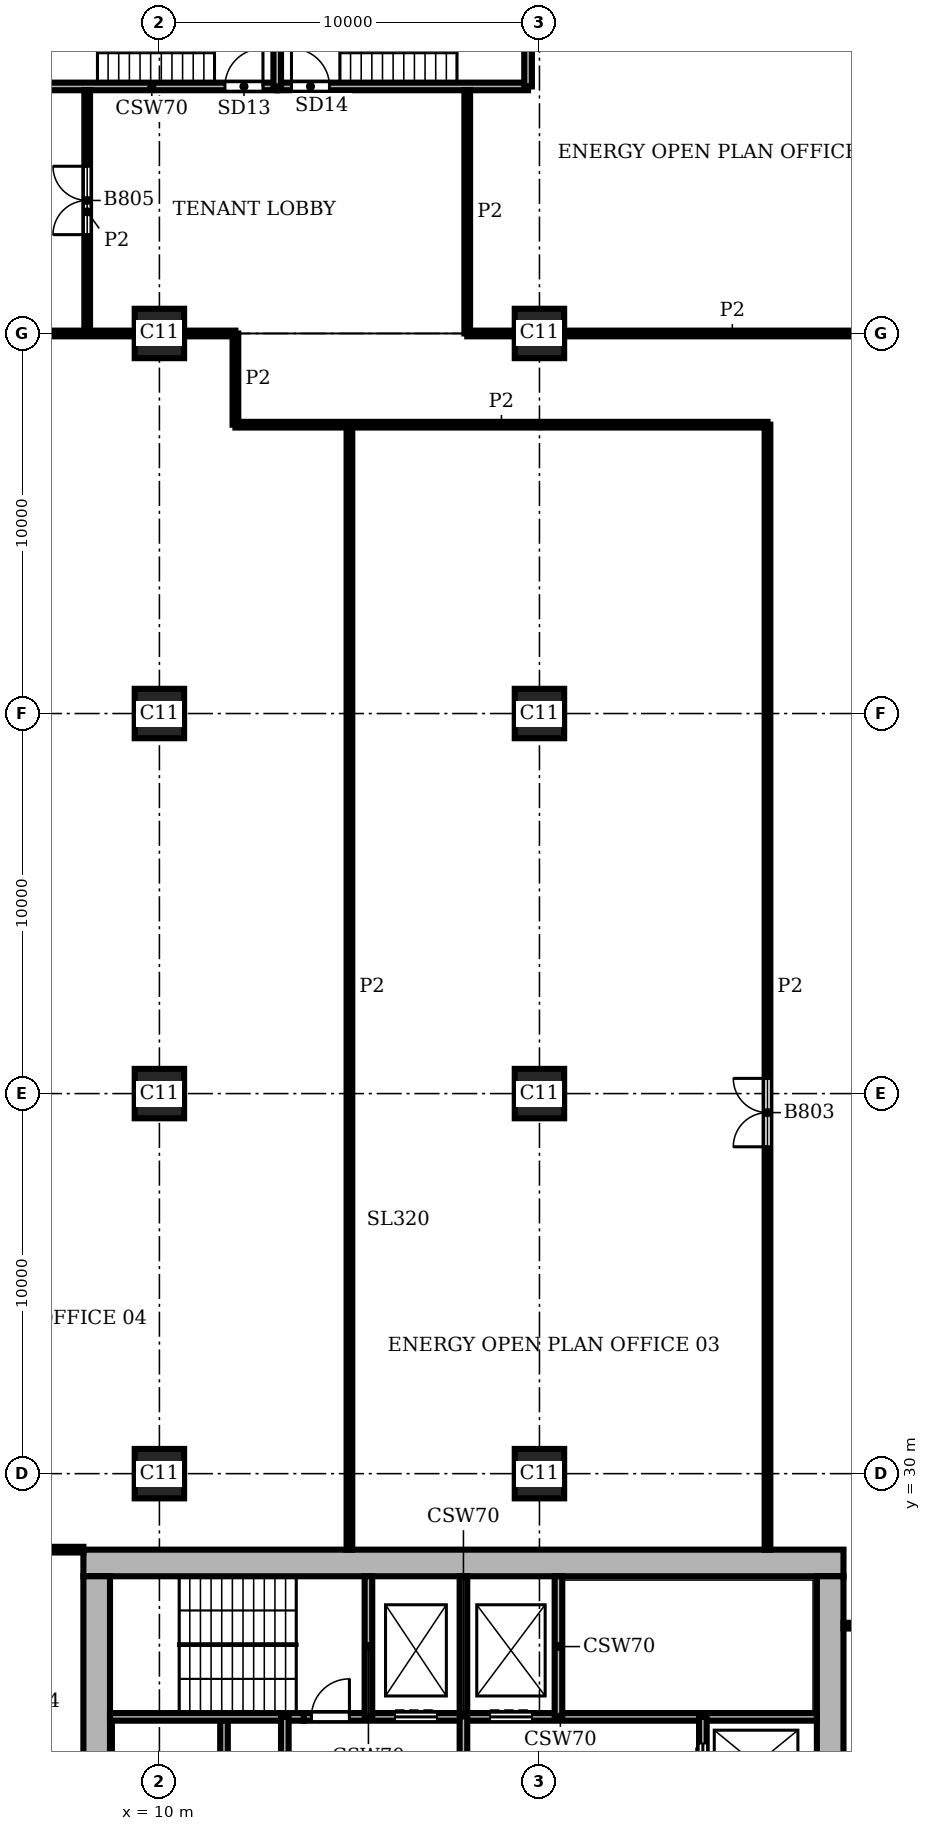
"""IFC4 building model, lengths in metres.
Left out: names, types, materials, properties, quantities, classifications, styles, units other than length and angle.
Written with IfcOpenShell. Run it as: python <this file> out.ifc"""

import sys

from ifc_helpers import new_model, si_unit, direction, frame, frame_2d, origin, origin_2d, place, context, subcontext, project, spatial, rectangle, extrude, element, fill, save


model = new_model("IFC4")
c1 = context("Model", 3, precision=1e-05, world=origin(), true_north=direction((0.0, 1.0)))
c2 = subcontext(c1, "Body", "Model", "MODEL_VIEW")
j1 = project(units=[si_unit("LENGTHUNIT", "METRE"), si_unit("PLANEANGLEUNIT", "RADIAN")], contexts=[c1])
p1 = place(None, origin())
s1 = spatial("IfcSite", under=j1, at=p1, CompositionType="ELEMENT")
p2 = place(p1, origin())
s2 = spatial("IfcBuilding", under=s1, at=p2, CompositionType="ELEMENT")
p3 = place(p2, frame((0.0, 0.0, 213.6)))
s3 = spatial("IfcBuildingStorey", under=s2, at=p3, CompositionType="ELEMENT", Elevation=213.6)
for number, where, z_axis, x_axis in (
    (1, (10.0, 30.0, 0.0), (0.0, 0.0, 1.0), (1.0, 0.0, 0.0)),
    (2, (10.0, 40.0, 0.0), (0.0, 0.0, 1.0), (1.0, 0.0, 0.0)),
    (3, (10.0, 50.0, 0.0), (0.0, 0.0, 1.0), (1.0, 0.0, 0.0)),
    (4, (10.0, 60.0, 0.0), (0.0, 0.0, 1.0), (1.0, 0.0, 0.0)),
    (5, (20.0, 30.0, 0.0), (0.0, 0.0, 1.0), (1.0, 0.0, 0.0)),
    (6, (20.0, 40.0, 0.0), (0.0, 0.0, 1.0), (1.0, 0.0, 0.0)),
    (7, (20.0, 50.0, 0.0), (0.0, 0.0, 1.0), (1.0, 0.0, 0.0)),
    (8, (20.0, 60.0, 0.0), (0.0, 0.0, 1.0), (1.0, 0.0, 0.0)),
):
    element("IfcColumn", number, at=place(p3, frame(where, z_axis=z_axis, x_axis=x_axis)), inside=s3, PredefinedType="COLUMN", context=c2, shape_type="SweptSolid", body=[
        extrude(rectangle(XDim=1.3, YDim=1.3, at=origin_2d()), origin(), (0.0, 0.0, 1.0), 3.9),
    ])
p4 = place(p3, frame((27.65, 8.7, 0.0), z_axis=(0.0, 0.0, 1.0), x_axis=(0.0, 1.0, 0.0)))
e9 = element("IfcWall", 9, at=p4, inside=s3, PredefinedType="SHEAR", context=c2, shape_type="SweptSolid", body=[
    extrude(rectangle(XDim=18.6, YDim=0.7, at=frame_2d((9.3, 0.0))), origin(), (0.0, 0.0, 1.0), 3.9),
])
p5 = place(p4, frame((4.75, 0.0, 0.0)))
e10 = element("IfcOpeningElement", 10, at=p5, cuts=e9, PredefinedType="OPENING", context=c2, shape_type="SweptSolid", body=[
    extrude(rectangle(XDim=1.6, YDim=2.1, at=frame_2d((0.8, 1.05))), frame((0.0, 0.36, 0.0), z_axis=(0.0, -1.0, 0.0), x_axis=(1.0, 0.0, 0.0)), (0.0, 0.0, 1.0), 0.72),
])
p6 = place(p3, frame((28.0, 27.65, 0.0), z_axis=(0.0, 0.0, 1.0), x_axis=(-1.0, 0.0, 0.0)))
e11 = element("IfcWall", 11, at=p6, inside=s3, PredefinedType="SHEAR", context=c2, shape_type="SweptSolid", body=[
    extrude(rectangle(XDim=20.0, YDim=0.7, at=frame_2d((10.0, 0.0))), origin(), (0.0, 0.0, 1.0), 3.9),
])
p7 = place(p3, frame((8.35, 27.3, 0.0), z_axis=(0.0, 0.0, 1.0), x_axis=(0.0, -1.0, 0.0)))
e12 = element("IfcWall", 12, at=p7, inside=s3, PredefinedType="SHEAR", context=c2, shape_type="SweptSolid", body=[
    extrude(rectangle(XDim=18.6, YDim=0.7, at=frame_2d((9.3, 0.0))), origin(), (0.0, 0.0, 1.0), 3.9),
])
p8 = place(p3, frame((29.357, 66.434, 0.0), z_axis=(0.0, 0.0, 1.0), x_axis=(-0.555541552266, 0.831488775454, 0.0)))
e13 = element("IfcWall", 13, at=p8, inside=s3, PredefinedType="SOLIDWALL", context=c2, shape_type="SweptSolid", body=[
    extrude(rectangle(XDim=4.753, YDim=0.4, at=frame_2d((2.376, 0.0))), origin(), (0.0, 0.0, 1.0), 3.9),
])
p9 = place(p8, frame((0.226, 0.0, 0.9)))
e14 = element("IfcOpeningElement", 14, at=p9, cuts=e13, PredefinedType="OPENING", context=c2, shape_type="SweptSolid", body=[
    extrude(rectangle(XDim=4.3, YDim=2.35, at=frame_2d((2.15, 1.175))), frame((0.0, 0.21, 0.0), z_axis=(0.0, -1.0, 0.0), x_axis=(1.0, 0.0, 0.0)), (0.0, 0.0, 1.0), 0.42),
])
p10 = place(p3, frame((8.7, 23.6, 0.0), z_axis=(0.0, 0.0, 1.0), x_axis=(1.0, 0.0, 0.0)))
e15 = element("IfcWall", 15, at=p10, inside=s3, PredefinedType="SHEAR", context=c2, shape_type="SweptSolid", body=[
    extrude(rectangle(XDim=5.1, YDim=0.2, at=frame_2d((2.55, 0.0))), origin(), (0.0, 0.0, 1.0), 3.58),
])
p11 = place(p3, frame((13.8, 23.6, 0.0), z_axis=(0.0, 0.0, 1.0), x_axis=(1.0, 0.0, 0.0)))
e16 = element("IfcWall", 16, at=p11, inside=s3, PredefinedType="SHEAR", context=c2, shape_type="SweptSolid", body=[
    extrude(rectangle(XDim=13.5, YDim=0.2, at=frame_2d((6.75, 0.0))), origin(), (0.0, 0.0, 1.0), 3.58),
])
p12 = place(p11, frame((2.4, 0.0, 0.0)))
e17 = element("IfcOpeningElement", 17, at=p12, cuts=e16, PredefinedType="OPENING", context=c2, shape_type="SweptSolid", body=[
    extrude(rectangle(XDim=1.1, YDim=2.1, at=frame_2d((0.55, 1.05))), frame((0.0, 0.11, 0.0), z_axis=(0.0, -1.0, 0.0), x_axis=(1.0, 0.0, 0.0)), (0.0, 0.0, 1.0), 0.22),
])
p13 = place(p11, frame((4.9, 0.0, 0.0)))
e18 = element("IfcOpeningElement", 18, at=p13, cuts=e16, PredefinedType="OPENING", context=c2, shape_type="SweptSolid", body=[
    extrude(rectangle(XDim=1.1, YDim=2.1, at=frame_2d((0.55, 1.05))), frame((0.0, 0.11, 0.0), z_axis=(0.0, -1.0, 0.0), x_axis=(1.0, 0.0, 0.0)), (0.0, 0.0, 1.0), 0.22),
])
p14 = place(p11, frame((0.2, 0.0, 0.0)))
e19 = element("IfcOpeningElement", 19, at=p14, cuts=e16, PredefinedType="OPENING", context=c2, shape_type="SweptSolid", body=[
    extrude(rectangle(XDim=1.0, YDim=2.1, at=frame_2d((0.5, 1.05))), frame((0.0, 0.11, 0.0), z_axis=(0.0, -1.0, 0.0), x_axis=(1.0, 0.0, 0.0)), (0.0, 0.0, 1.0), 0.22),
])
p15 = place(p3, frame((6.5, 66.5, 0.0), z_axis=(0.0, 0.0, 1.0), x_axis=(1.0, 0.0, 0.0)))
e20 = element("IfcWall", 20, at=p15, inside=s3, PredefinedType="SHEAR", context=c2, shape_type="SweptSolid", body=[
    extrude(rectangle(XDim=6.6, YDim=0.2, at=frame_2d((3.3, 0.0))), origin(), (0.0, 0.0, 1.0), 3.58),
])
p16 = place(p15, frame((5.225, 0.0, 0.0)))
e21 = element("IfcOpeningElement", 21, at=p16, cuts=e20, PredefinedType="OPENING", context=c2, shape_type="SweptSolid", body=[
    extrude(rectangle(XDim=1.0, YDim=2.1, at=frame_2d((0.5, 1.05))), frame((0.0, 0.11, 0.0), z_axis=(0.0, -1.0, 0.0), x_axis=(1.0, 0.0, 0.0)), (0.0, 0.0, 1.0), 0.22),
])
p17 = place(p3, frame((13.1, 66.5, 0.0), z_axis=(0.0, 0.0, 1.0), x_axis=(1.0, 0.0, 0.0)))
e22 = element("IfcWall", 22, at=p17, inside=s3, PredefinedType="SHEAR", context=c2, shape_type="SweptSolid", body=[
    extrude(rectangle(XDim=6.6, YDim=0.2, at=frame_2d((3.3, 0.0))), origin(), (0.0, 0.0, 1.0), 3.58),
])
p18 = place(p17, frame((0.375, 0.0, 0.0)))
e23 = element("IfcOpeningElement", 23, at=p18, cuts=e22, PredefinedType="OPENING", context=c2, shape_type="SweptSolid", body=[
    extrude(rectangle(XDim=1.0, YDim=2.1, at=frame_2d((0.5, 1.05))), frame((0.0, 0.11, 0.0), z_axis=(0.0, -1.0, 0.0), x_axis=(1.0, 0.0, 0.0)), (0.0, 0.0, 1.0), 0.22),
])
p19 = place(p3, frame((11.7, 12.4, 0.0), z_axis=(0.0, 0.0, 1.0), x_axis=(0.0, 1.0, 0.0)))
e24 = element("IfcWall", 24, at=p19, inside=s3, PredefinedType="SHEAR", context=c2, shape_type="SweptSolid", body=[
    extrude(rectangle(XDim=11.2, YDim=0.2, at=frame_2d((5.6, 0.0))), origin(), (0.0, 0.0, 1.0), 3.58),
])
p20 = place(p19, frame((0.7, 0.0, 0.0)))
e25 = element("IfcOpeningElement", 25, at=p20, cuts=e24, PredefinedType="OPENING", context=c2, shape_type="SweptSolid", body=[
    extrude(rectangle(XDim=1.1, YDim=2.1, at=frame_2d((0.55, 1.05))), frame((0.0, 0.11, 0.0), z_axis=(0.0, -1.0, 0.0), x_axis=(1.0, 0.0, 0.0)), (0.0, 0.0, 1.0), 0.22),
])
p21 = place(p19, frame((3.2, 0.0, 0.0)))
e26 = element("IfcOpeningElement", 26, at=p21, cuts=e24, PredefinedType="OPENING", context=c2, shape_type="SweptSolid", body=[
    extrude(rectangle(XDim=1.1, YDim=2.1, at=frame_2d((0.55, 1.05))), frame((0.0, 0.11, 0.0), z_axis=(0.0, -1.0, 0.0), x_axis=(1.0, 0.0, 0.0)), (0.0, 0.0, 1.0), 0.22),
])
p22 = place(p19, frame((5.7, 0.0, 0.0)))
e27 = element("IfcOpeningElement", 27, at=p22, cuts=e24, PredefinedType="OPENING", context=c2, shape_type="SweptSolid", body=[
    extrude(rectangle(XDim=1.1, YDim=2.1, at=frame_2d((0.55, 1.05))), frame((0.0, 0.11, 0.0), z_axis=(0.0, -1.0, 0.0), x_axis=(1.0, 0.0, 0.0)), (0.0, 0.0, 1.0), 0.22),
])
p23 = place(p19, frame((8.2, 0.0, 0.0)))
e28 = element("IfcOpeningElement", 28, at=p23, cuts=e24, PredefinedType="OPENING", context=c2, shape_type="SweptSolid", body=[
    extrude(rectangle(XDim=1.1, YDim=2.1, at=frame_2d((0.55, 1.05))), frame((0.0, 0.11, 0.0), z_axis=(0.0, -1.0, 0.0), x_axis=(1.0, 0.0, 0.0)), (0.0, 0.0, 1.0), 0.22),
])
p24 = place(p3, frame((13.1, 66.5, 0.0), z_axis=(0.0, 0.0, 1.0), x_axis=(0.0, 1.0, 0.0)))
e29 = element("IfcWall", 29, at=p24, inside=s3, PredefinedType="SHEAR", context=c2, shape_type="SweptSolid", body=[
    extrude(rectangle(XDim=3.3, YDim=0.2, at=frame_2d((1.65, 0.0))), origin(), (0.0, 0.0, 1.0), 3.58),
])
p25 = place(p3, frame((13.3, 20.0, 0.0), z_axis=(0.0, 0.0, 1.0), x_axis=(0.0, 1.0, 0.0)))
e30 = element("IfcWall", 30, at=p25, inside=s3, PredefinedType="SHEAR", context=c2, shape_type="SweptSolid", body=[
    extrude(rectangle(XDim=3.6, YDim=0.2, at=frame_2d((1.8, 0.0))), origin(), (0.0, 0.0, 1.0), 3.58),
])
p26 = place(p3, frame((15.5, 23.6, 0.0), z_axis=(0.0, 0.0, 1.0), x_axis=(0.0, 1.0, 0.0)))
e31 = element("IfcWall", 31, at=p26, inside=s3, PredefinedType="SHEAR", context=c2, shape_type="SweptSolid", body=[
    extrude(rectangle(XDim=3.7, YDim=0.2, at=frame_2d((1.85, 0.0))), origin(), (0.0, 0.0, 1.0), 3.58),
])
p27 = place(p3, frame((18.0, 20.0, 0.0), z_axis=(0.0, 0.0, 1.0), x_axis=(0.0, 1.0, 0.0)))
e32 = element("IfcWall", 32, at=p27, inside=s3, PredefinedType="SHEAR", context=c2, shape_type="SweptSolid", body=[
    extrude(rectangle(XDim=7.3, YDim=0.2, at=frame_2d((3.65, 0.0))), origin(), (0.0, 0.0, 1.0), 3.58),
])
p28 = place(p27, frame((1.2, 0.0, 0.0)))
e33 = element("IfcOpeningElement", 33, at=p28, cuts=e32, PredefinedType="OPENING", context=c2, shape_type="SweptSolid", body=[
    extrude(rectangle(XDim=1.2, YDim=2.1, at=frame_2d((0.6, 1.05))), frame((0.0, 0.11, 0.0), z_axis=(0.0, -1.0, 0.0), x_axis=(1.0, 0.0, 0.0)), (0.0, 0.0, 1.0), 0.22),
])
p29 = place(p3, frame((19.7, 66.5, 0.0), z_axis=(0.0, 0.0, 1.0), x_axis=(0.0, 1.0, 0.0)))
e34 = element("IfcWall", 34, at=p29, inside=s3, PredefinedType="SHEAR", context=c2, shape_type="SweptSolid", body=[
    extrude(rectangle(XDim=3.3, YDim=0.2, at=frame_2d((1.65, 0.0))), origin(), (0.0, 0.0, 1.0), 3.58),
])
p30 = place(p3, frame((20.5, 23.6, 0.0), z_axis=(0.0, 0.0, 1.0), x_axis=(0.0, 1.0, 0.0)))
e35 = element("IfcWall", 35, at=p30, inside=s3, PredefinedType="SHEAR", context=c2, shape_type="SweptSolid", body=[
    extrude(rectangle(XDim=3.7, YDim=0.2, at=frame_2d((1.85, 0.0))), origin(), (0.0, 0.0, 1.0), 3.58),
])
p31 = place(p3, frame((24.3, 16.1, 0.0), z_axis=(0.0, 0.0, 1.0), x_axis=(0.0, 1.0, 0.0)))
e36 = element("IfcWall", 36, at=p31, inside=s3, PredefinedType="SHEAR", context=c2, shape_type="SweptSolid", body=[
    extrude(rectangle(XDim=7.5, YDim=0.2, at=frame_2d((3.75, 0.0))), origin(), (0.0, 0.0, 1.0), 3.58),
])
p32 = place(p31, frame((5.7, 0.0, 0.0)))
e37 = element("IfcOpeningElement", 37, at=p32, cuts=e36, PredefinedType="OPENING", context=c2, shape_type="SweptSolid", body=[
    extrude(rectangle(XDim=1.1, YDim=2.1, at=frame_2d((0.55, 1.05))), frame((0.0, 0.11, 0.0), z_axis=(0.0, -1.0, 0.0), x_axis=(1.0, 0.0, 0.0)), (0.0, 0.0, 1.0), 0.22),
])
p33 = place(p3, frame((8.1, 60.0, 0.0), z_axis=(0.0, 0.0, 1.0), x_axis=(0.0, 1.0, 0.0)))
e38 = element("IfcWall", 38, at=p33, inside=s3, PredefinedType="PARTITIONING", context=c2, shape_type="SweptSolid", body=[
    extrude(rectangle(XDim=6.4, YDim=0.15, at=frame_2d((3.2, 0.0))), origin(), (0.0, 0.0, 1.0), 3.58),
])
p34 = place(p33, frame((2.6, 0.0, 0.0)))
e39 = element("IfcOpeningElement", 39, at=p34, cuts=e38, PredefinedType="OPENING", context=c2, shape_type="SweptSolid", body=[
    extrude(rectangle(XDim=1.8, YDim=2.1, at=frame_2d((0.9, 1.05))), frame((0.0, 0.085, 0.0), z_axis=(0.0, -1.0, 0.0), x_axis=(1.0, 0.0, 0.0)), (0.0, 0.0, 1.0), 0.17),
])
p35 = place(p3, frame((12.0, 57.6, 0.0), z_axis=(0.0, 0.0, 1.0), x_axis=(0.0, 1.0, 0.0)))
e40 = element("IfcWall", 40, at=p35, inside=s3, PredefinedType="PARTITIONING", context=c2, shape_type="SweptSolid", body=[
    extrude(rectangle(XDim=2.4, YDim=0.15, at=frame_2d((1.2, 0.0))), origin(), (0.0, 0.0, 1.0), 3.58),
])
p36 = place(p3, frame((15.0, 28.0, 0.0), z_axis=(0.0, 0.0, 1.0), x_axis=(0.0, 1.0, 0.0)))
e41 = element("IfcWall", 41, at=p36, inside=s3, PredefinedType="PARTITIONING", context=c2, shape_type="SweptSolid", body=[
    extrude(rectangle(XDim=29.6, YDim=0.15, at=frame_2d((14.8, 0.0))), origin(), (0.0, 0.0, 1.0), 3.58),
])
p37 = place(p3, frame((18.1, 60.0, 0.0), z_axis=(0.0, 0.0, 1.0), x_axis=(0.0, 1.0, 0.0)))
e42 = element("IfcWall", 42, at=p37, inside=s3, PredefinedType="PARTITIONING", context=c2, shape_type="SweptSolid", body=[
    extrude(rectangle(XDim=6.4, YDim=0.15, at=frame_2d((3.2, 0.0))), origin(), (0.0, 0.0, 1.0), 3.58),
])
p38 = place(p3, frame((26.0, 28.0, 0.0), z_axis=(0.0, 0.0, 1.0), x_axis=(0.0, 1.0, 0.0)))
e43 = element("IfcWall", 43, at=p38, inside=s3, PredefinedType="PARTITIONING", context=c2, shape_type="SweptSolid", body=[
    extrude(rectangle(XDim=29.6, YDim=0.15, at=frame_2d((14.8, 0.0))), origin(), (0.0, 0.0, 1.0), 3.58),
])
p39 = place(p38, frame((10.6, 0.0, 0.0)))
e44 = element("IfcOpeningElement", 44, at=p39, cuts=e43, PredefinedType="OPENING", context=c2, shape_type="SweptSolid", body=[
    extrude(rectangle(XDim=1.8, YDim=2.1, at=frame_2d((0.9, 1.05))), frame((0.0, 0.085, 0.0), z_axis=(0.0, -1.0, 0.0), x_axis=(1.0, 0.0, 0.0)), (0.0, 0.0, 1.0), 0.17),
])
p40 = place(p3, frame((28.0, 26.0, 0.0), z_axis=(0.0, 0.0, 1.0), x_axis=(1.0, 0.0, 0.0)))
e45 = element("IfcWall", 45, at=p40, inside=s3, PredefinedType="PARTITIONING", context=c2, shape_type="SweptSolid", body=[
    extrude(rectangle(XDim=2.8, YDim=0.15, at=frame_2d((1.4, 0.0))), origin(), (0.0, 0.0, 1.0), 3.58),
])
p41 = place(p3, frame((5.6, 28.0, 0.0), z_axis=(0.0, 0.0, 1.0), x_axis=(1.0, 0.0, 0.0)))
e46 = element("IfcWall", 46, at=p41, inside=s3, PredefinedType="PARTITIONING", context=c2, shape_type="SweptSolid", body=[
    extrude(rectangle(XDim=2.4, YDim=0.15, at=frame_2d((1.2, 0.0))), origin(), (0.0, 0.0, 1.0), 3.58),
])
p42 = place(p3, frame((12.0, 57.6, 0.0), z_axis=(0.0, 0.0, 1.0), x_axis=(1.0, 0.0, 0.0)))
e47 = element("IfcWall", 47, at=p42, inside=s3, PredefinedType="PARTITIONING", context=c2, shape_type="SweptSolid", body=[
    extrude(rectangle(XDim=14.0, YDim=0.15, at=frame_2d((7.0, 0.0))), origin(), (0.0, 0.0, 1.0), 3.58),
])
p43 = place(p3, frame((0.5, 60.0, 0.0), z_axis=(0.0, 0.0, 1.0), x_axis=(1.0, 0.0, 0.0)))
e48 = element("IfcWall", 48, at=p43, inside=s3, PredefinedType="PARTITIONING", context=c2, shape_type="SweptSolid", body=[
    extrude(rectangle(XDim=8.85, YDim=0.15, at=frame_2d((4.425, 0.0))), origin(), (0.0, 0.0, 1.0), 3.58),
])
p44 = place(p3, frame((10.65, 60.0, 0.0), z_axis=(0.0, 0.0, 1.0), x_axis=(1.0, 0.0, 0.0)))
e49 = element("IfcWall", 49, at=p44, inside=s3, PredefinedType="PARTITIONING", context=c2, shape_type="SweptSolid", body=[
    extrude(rectangle(XDim=1.35, YDim=0.15, at=frame_2d((0.675, 0.0))), origin(), (0.0, 0.0, 1.0), 3.58),
])
p45 = place(p3, frame((18.1, 60.0, 0.0), z_axis=(0.0, 0.0, 1.0), x_axis=(1.0, 0.0, 0.0)))
e50 = element("IfcWall", 50, at=p45, inside=s3, PredefinedType="PARTITIONING", context=c2, shape_type="SweptSolid", body=[
    extrude(rectangle(XDim=1.25, YDim=0.15, at=frame_2d((0.625, 0.0))), origin(), (0.0, 0.0, 1.0), 3.58),
])
p46 = place(p3, frame((20.65, 60.0, 0.0), z_axis=(0.0, 0.0, 1.0), x_axis=(1.0, 0.0, 0.0)))
e51 = element("IfcWall", 51, at=p46, inside=s3, PredefinedType="PARTITIONING", context=c2, shape_type="SweptSolid", body=[
    extrude(rectangle(XDim=8.85, YDim=0.15, at=frame_2d((4.425, 0.0))), origin(), (0.0, 0.0, 1.0), 3.58),
])
p47 = place(p9, origin())
e52 = element("IfcWindow", 52, at=p47, inside=s3, PartitioningType="SINGLE_PANEL", PredefinedType="WINDOW", context=c2, shape_type="SweptSolid", body=[
    extrude(rectangle(XDim=4.3, YDim=2.35, at=frame_2d((2.15, 1.175))), frame((0.0, 0.16, 0.0), z_axis=(0.0, -1.0, 0.0), x_axis=(1.0, 0.0, 0.0)), (0.0, 0.0, 1.0), 0.06),
])
fill(e14, e52)
p48 = place(p32, origin())
e53 = element("IfcDoor", 53, at=p48, inside=s3, OperationType="DOUBLE_DOOR_SLIDING", PredefinedType="DOOR", context=c2, shape_type="SweptSolid", body=[
    extrude(rectangle(XDim=1.1, YDim=2.1, at=frame_2d((0.55, 1.05))), frame((0.0, 0.025, 0.0), z_axis=(0.0, -1.0, 0.0), x_axis=(1.0, 0.0, 0.0)), (0.0, 0.0, 1.0), 0.05),
])
fill(e37, e53)
p49 = place(p12, origin())
e54 = element("IfcDoor", 54, at=p49, inside=s3, OperationType="DOUBLE_DOOR_SLIDING", PredefinedType="DOOR", context=c2, shape_type="SweptSolid", body=[
    extrude(rectangle(XDim=1.1, YDim=2.1, at=frame_2d((0.55, 1.05))), frame((0.0, 0.025, 0.0), z_axis=(0.0, -1.0, 0.0), x_axis=(1.0, 0.0, 0.0)), (0.0, 0.0, 1.0), 0.05),
])
fill(e17, e54)
p50 = place(p13, origin())
e55 = element("IfcDoor", 55, at=p50, inside=s3, OperationType="DOUBLE_DOOR_SLIDING", PredefinedType="DOOR", context=c2, shape_type="SweptSolid", body=[
    extrude(rectangle(XDim=1.1, YDim=2.1, at=frame_2d((0.55, 1.05))), frame((0.0, 0.025, 0.0), z_axis=(0.0, -1.0, 0.0), x_axis=(1.0, 0.0, 0.0)), (0.0, 0.0, 1.0), 0.05),
])
fill(e18, e55)
p51 = place(p14, origin())
e56 = element("IfcDoor", 56, at=p51, inside=s3, OperationType="SINGLE_SWING_RIGHT", PredefinedType="DOOR", context=c2, shape_type="SweptSolid", body=[
    extrude(rectangle(XDim=1.0, YDim=2.1, at=frame_2d((0.5, 1.05))), frame((0.0, 0.025, 0.0), z_axis=(0.0, -1.0, 0.0), x_axis=(1.0, 0.0, 0.0)), (0.0, 0.0, 1.0), 0.05),
])
fill(e19, e56)
p52 = place(p16, origin())
e57 = element("IfcDoor", 57, at=p52, inside=s3, OperationType="SINGLE_SWING_RIGHT", PredefinedType="DOOR", context=c2, shape_type="SweptSolid", body=[
    extrude(rectangle(XDim=1.0, YDim=2.1, at=frame_2d((0.5, 1.05))), frame((0.0, 0.025, 0.0), z_axis=(0.0, -1.0, 0.0), x_axis=(1.0, 0.0, 0.0)), (0.0, 0.0, 1.0), 0.05),
])
fill(e21, e57)
p53 = place(p18, origin())
e58 = element("IfcDoor", 58, at=p53, inside=s3, OperationType="SINGLE_SWING_LEFT", PredefinedType="DOOR", context=c2, shape_type="SweptSolid", body=[
    extrude(rectangle(XDim=1.0, YDim=2.1, at=frame_2d((0.5, 1.05))), frame((0.0, 0.025, 0.0), z_axis=(0.0, -1.0, 0.0), x_axis=(1.0, 0.0, 0.0)), (0.0, 0.0, 1.0), 0.05),
])
fill(e23, e58)
p54 = place(p39, origin())
e59 = element("IfcDoor", 59, at=p54, inside=s3, OperationType="DOUBLE_DOOR_SINGLE_SWING", PredefinedType="DOOR", context=c2, shape_type="SweptSolid", body=[
    extrude(rectangle(XDim=1.8, YDim=2.1, at=frame_2d((0.9, 1.05))), frame((0.0, 0.025, 0.0), z_axis=(0.0, -1.0, 0.0), x_axis=(1.0, 0.0, 0.0)), (0.0, 0.0, 1.0), 0.05),
])
fill(e44, e59)
p55 = place(p34, origin())
e60 = element("IfcDoor", 60, at=p55, inside=s3, OperationType="DOUBLE_DOOR_SINGLE_SWING", PredefinedType="DOOR", context=c2, shape_type="SweptSolid", body=[
    extrude(rectangle(XDim=1.8, YDim=2.1, at=frame_2d((0.9, 1.05))), frame((0.0, 0.025, 0.0), z_axis=(0.0, -1.0, 0.0), x_axis=(1.0, 0.0, 0.0)), (0.0, 0.0, 1.0), 0.05),
])
fill(e39, e60)
save(model, sys.argv[1])
